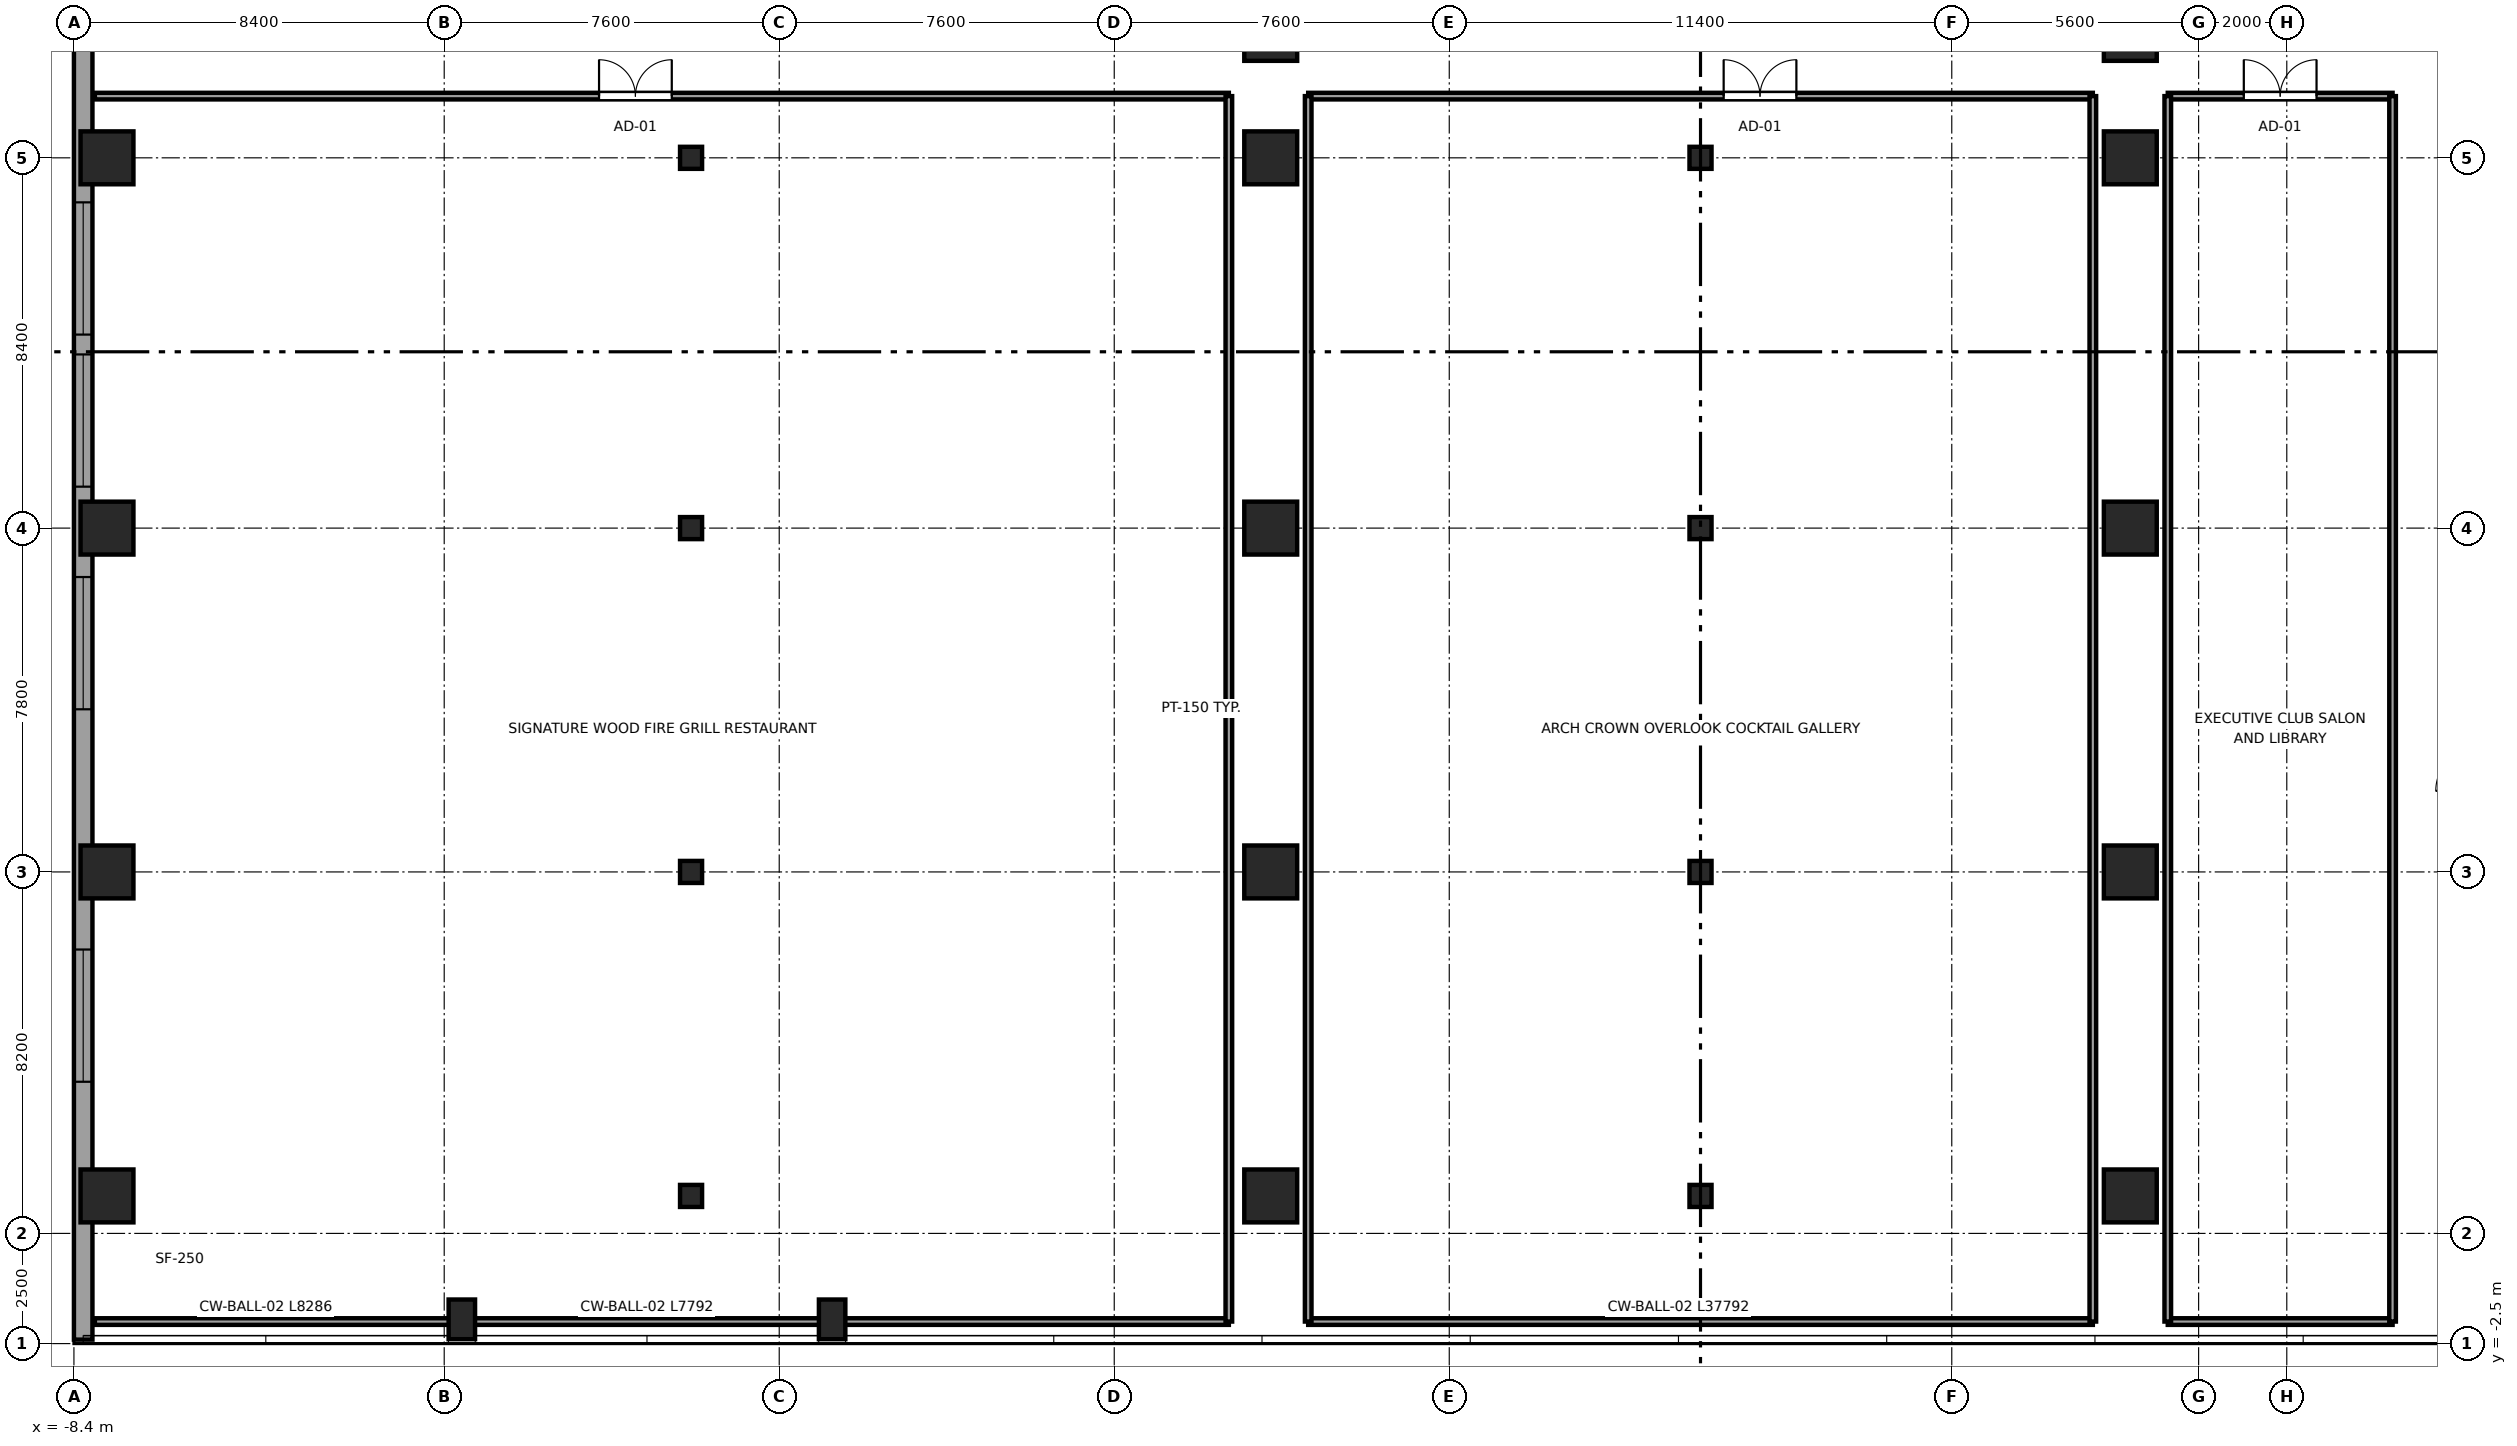
"""IFC4 building model, lengths in metres.
Left out: names, types, materials, properties, quantities, classifications, styles, units other than length and angle.
Written with IfcOpenShell. Run it as: python <this file> out.ifc"""

import sys

from ifc_helpers import new_model, si_unit, direction, frame, frame_2d, origin, origin_2d, place, context, subcontext, project, spatial, rectangle, i_section, extrude, source, transform, mapped, element, fill, save


model = new_model("IFC4")
c1 = context("Model", 3, precision=1e-05, world=origin(), true_north=direction((0.0, 1.0)))
c2 = subcontext(c1, "Body", "Model", "MODEL_VIEW")
j1 = project(units=[si_unit("LENGTHUNIT", "METRE"), si_unit("PLANEANGLEUNIT", "RADIAN")], contexts=[c1])
p1 = place(None, origin())
s1 = spatial("IfcSite", under=j1, at=p1, CompositionType="ELEMENT")
p2 = place(p1, origin())
s2 = spatial("IfcBuilding", under=s1, at=p2, CompositionType="ELEMENT")
p3 = place(p2, frame((0.0, 0.0, 22.4)))
s3 = spatial("IfcBuildingStorey", under=s2, at=p3, CompositionType="ELEMENT", Elevation=22.4)
m1 = source(origin(), c2, "Body", "SweptSolid", [
    extrude(rectangle(XDim=1.2, YDim=1.2, at=origin_2d()), origin(), (0.0, 0.0, 1.0), 4.4),
])
for number, where, z_axis, x_axis in (
    (1, (-7.65, 0.85, 0.0), (0.0, 0.0, 1.0), (1.0, 0.0, 0.0)),
    (2, (-7.65, 8.2, 0.0), (0.0, 0.0, 1.0), (1.0, 0.0, 0.0)),
    (3, (-7.65, 16.0, 0.0), (0.0, 0.0, 1.0), (1.0, 0.0, 0.0)),
    (4, (-7.65, 24.4, 0.0), (0.0, 0.0, 1.0), (1.0, 0.0, 0.0)),
    (5, (18.75, 0.85, 0.0), (0.0, 0.0, 1.0), (1.0, 0.0, 0.0)),
    (6, (38.25, 0.85, 0.0), (0.0, 0.0, 1.0), (1.0, 0.0, 0.0)),
    (7, (18.75, 8.2, 0.0), (0.0, 0.0, 1.0), (1.0, 0.0, 0.0)),
    (8, (38.25, 8.2, 0.0), (0.0, 0.0, 1.0), (1.0, 0.0, 0.0)),
    (9, (18.75, 16.0, 0.0), (0.0, 0.0, 1.0), (1.0, 0.0, 0.0)),
    (10, (38.25, 16.0, 0.0), (0.0, 0.0, 1.0), (1.0, 0.0, 0.0)),
    (11, (18.75, 24.4, 0.0), (0.0, 0.0, 1.0), (1.0, 0.0, 0.0)),
    (12, (38.25, 24.4, 0.0), (0.0, 0.0, 1.0), (1.0, 0.0, 0.0)),
    (13, (18.75, 27.2, 0.0), (0.0, 0.0, 1.0), (1.0, 0.0, 0.0)),
    (14, (38.25, 27.2, 0.0), (0.0, 0.0, 1.0), (1.0, 0.0, 0.0)),
):
    element("IfcColumn", number, at=place(p3, frame(where, z_axis=z_axis, x_axis=x_axis)), inside=s3, PredefinedType="COLUMN", context=c2, shape_type="MappedRepresentation", body=[
        mapped(m1, transform((0.0, 0.0, 0.0), x_axis=(1.0, 0.0, 0.0), y_axis=(0.0, 1.0, 0.0), z_axis=(0.0, 0.0, 1.0), scale=1.0)),
    ])
m2 = source(origin(), c2, "Body", "SweptSolid", [
    extrude(i_section(OverallWidth=0.5, OverallDepth=0.5, WebThickness=0.028, FlangeThickness=0.045, at=origin_2d()), origin(), (0.0, 0.0, 1.0), 4.4),
])
for number, where, z_axis, x_axis in (
    (15, (5.6, 0.85, 0.0), (0.0, 0.0, 1.0), (1.0, 0.0, 0.0)),
    (16, (5.6, 8.2, 0.0), (0.0, 0.0, 1.0), (1.0, 0.0, 0.0)),
    (17, (5.6, 16.0, 0.0), (0.0, 0.0, 1.0), (1.0, 0.0, 0.0)),
    (18, (5.6, 24.4, 0.0), (0.0, 0.0, 1.0), (1.0, 0.0, 0.0)),
    (19, (28.5, 0.85, 0.0), (0.0, 0.0, 1.0), (1.0, 0.0, 0.0)),
    (20, (28.5, 8.2, 0.0), (0.0, 0.0, 1.0), (1.0, 0.0, 0.0)),
    (21, (28.5, 16.0, 0.0), (0.0, 0.0, 1.0), (1.0, 0.0, 0.0)),
    (22, (28.5, 24.4, 0.0), (0.0, 0.0, 1.0), (1.0, 0.0, 0.0)),
):
    element("IfcColumn", number, at=place(p3, frame(where, z_axis=z_axis, x_axis=x_axis)), inside=s3, PredefinedType="COLUMN", context=c2, shape_type="MappedRepresentation", body=[
        mapped(m2, transform((0.0, 0.0, 0.0), x_axis=(1.0, 0.0, 0.0), y_axis=(0.0, 1.0, 0.0), z_axis=(0.0, 0.0, 1.0), scale=1.0)),
    ])
m3 = source(origin(), c2, "Body", "SweptSolid", [
    extrude(rectangle(XDim=0.6, YDim=0.9, at=origin_2d()), origin(), (0.0, 0.0, 1.0), 4.4),
])
for number, where, z_axis, x_axis in (
    (23, (0.4, -1.95, 0.0), (0.0, 0.0, 1.0), (1.0, 0.0, 0.0)),
    (24, (8.8, -1.95, 0.0), (0.0, 0.0, 1.0), (1.0, 0.0, 0.0)),
):
    element("IfcColumn", number, at=place(p3, frame(where, z_axis=z_axis, x_axis=x_axis)), inside=s3, PredefinedType="PILASTER", context=c2, shape_type="MappedRepresentation", body=[
        mapped(m3, transform((0.0, 0.0, 0.0), x_axis=(1.0, 0.0, 0.0), y_axis=(0.0, 1.0, 0.0), z_axis=(0.0, 0.0, 1.0), scale=1.0)),
    ])
p4 = place(p3, frame((-8.19, 48.29, 0.0), z_axis=(0.0, 0.0, 1.0), x_axis=(0.0, -1.0, 0.0)))
e25 = element("IfcWall", 25, at=p4, inside=s3, PredefinedType="SOLIDWALL", context=c2, shape_type="SweptSolid", body=[
    extrude(rectangle(XDim=50.7, YDim=0.42, at=frame_2d((25.35, 0.0))), origin(), (0.0, 0.0, 1.0), 4.14),
])
p5 = place(p4, frame((5.85, 0.0, 0.65)))
e26 = element("IfcOpeningElement", 26, at=p5, cuts=e25, PredefinedType="OPENING", context=c2, shape_type="SweptSolid", body=[
    extrude(rectangle(XDim=3.0, YDim=2.5, at=frame_2d((1.5, 1.25))), frame((0.0, 0.22, 0.0), z_axis=(0.0, -1.0, 0.0), x_axis=(1.0, 0.0, 0.0)), (0.0, 0.0, 1.0), 0.44),
])
p6 = place(p4, frame((10.35, 0.0, 0.65)))
e27 = element("IfcOpeningElement", 27, at=p6, cuts=e25, PredefinedType="OPENING", context=c2, shape_type="SweptSolid", body=[
    extrude(rectangle(XDim=3.0, YDim=2.5, at=frame_2d((1.5, 1.25))), frame((0.0, 0.22, 0.0), z_axis=(0.0, -1.0, 0.0), x_axis=(1.0, 0.0, 0.0)), (0.0, 0.0, 1.0), 0.44),
])
p7 = place(p4, frame((24.9, 0.0, 0.65)))
e28 = element("IfcOpeningElement", 28, at=p7, cuts=e25, PredefinedType="OPENING", context=c2, shape_type="SweptSolid", body=[
    extrude(rectangle(XDim=3.0, YDim=2.5, at=frame_2d((1.5, 1.25))), frame((0.0, 0.22, 0.0), z_axis=(0.0, -1.0, 0.0), x_axis=(1.0, 0.0, 0.0)), (0.0, 0.0, 1.0), 0.44),
])
p8 = place(p4, frame((28.35, 0.0, 0.65)))
e29 = element("IfcOpeningElement", 29, at=p8, cuts=e25, PredefinedType="OPENING", context=c2, shape_type="SweptSolid", body=[
    extrude(rectangle(XDim=3.0, YDim=2.5, at=frame_2d((1.5, 1.25))), frame((0.0, 0.22, 0.0), z_axis=(0.0, -1.0, 0.0), x_axis=(1.0, 0.0, 0.0)), (0.0, 0.0, 1.0), 0.44),
])
p9 = place(p4, frame((33.4, 0.0, 0.65)))
e30 = element("IfcOpeningElement", 30, at=p9, cuts=e25, PredefinedType="OPENING", context=c2, shape_type="SweptSolid", body=[
    extrude(rectangle(XDim=3.0, YDim=2.5, at=frame_2d((1.5, 1.25))), frame((0.0, 0.22, 0.0), z_axis=(0.0, -1.0, 0.0), x_axis=(1.0, 0.0, 0.0)), (0.0, 0.0, 1.0), 0.44),
])
p10 = place(p4, frame((41.85, 0.0, 0.65)))
e31 = element("IfcOpeningElement", 31, at=p10, cuts=e25, PredefinedType="OPENING", context=c2, shape_type="SweptSolid", body=[
    extrude(rectangle(XDim=3.0, YDim=2.5, at=frame_2d((1.5, 1.25))), frame((0.0, 0.22, 0.0), z_axis=(0.0, -1.0, 0.0), x_axis=(1.0, 0.0, 0.0)), (0.0, 0.0, 1.0), 0.44),
])
p11 = place(p3, frame((-7.925, -2.0, 0.0), z_axis=(0.0, 0.0, 1.0), x_axis=(1.0, 0.0, 0.0)))
e32 = element("IfcWall", 32, at=p11, inside=s3, PredefinedType="PARTITIONING", context=c2, shape_type="SweptSolid", body=[
    extrude(rectangle(XDim=25.725, YDim=0.15, at=frame_2d((12.863, 0.0))), origin(), (0.0, 0.0, 1.0), 3.43),
])
p12 = place(p3, frame((-7.925, 25.8, 0.0), z_axis=(0.0, 0.0, 1.0), x_axis=(1.0, 0.0, 0.0)))
e33 = element("IfcWall", 33, at=p12, inside=s3, PredefinedType="PARTITIONING", context=c2, shape_type="SweptSolid", body=[
    extrude(rectangle(XDim=25.725, YDim=0.15, at=frame_2d((12.863, 0.0))), origin(), (0.0, 0.0, 1.0), 4.14),
])
p13 = place(p12, frame((11.438, 0.0, 0.0)))
e34 = element("IfcOpeningElement", 34, at=p13, cuts=e33, PredefinedType="OPENING", context=c2, shape_type="SweptSolid", body=[
    extrude(rectangle(XDim=1.65, YDim=2.15, at=frame_2d((0.825, 1.075))), frame((0.0, 0.085, 0.0), z_axis=(0.0, -1.0, 0.0), x_axis=(1.0, 0.0, 0.0)), (0.0, 0.0, 1.0), 0.17),
])
p14 = place(p3, frame((17.8, -2.0, 0.0), z_axis=(0.0, 0.0, 1.0), x_axis=(0.0, 1.0, 0.0)))
e35 = element("IfcWall", 35, at=p14, inside=s3, PredefinedType="PARTITIONING", context=c2, shape_type="SweptSolid", body=[
    extrude(rectangle(XDim=27.8, YDim=0.15, at=frame_2d((13.9, 0.0))), origin(), (0.0, 0.0, 1.0), 4.14),
])
p15 = place(p3, frame((19.6, -2.0, 0.0), z_axis=(0.0, 0.0, 1.0), x_axis=(1.0, 0.0, 0.0)))
e36 = element("IfcWall", 36, at=p15, inside=s3, PredefinedType="PARTITIONING", context=c2, shape_type="SweptSolid", body=[
    extrude(rectangle(XDim=17.8, YDim=0.15, at=frame_2d((8.9, 0.0))), origin(), (0.0, 0.0, 1.0), 4.14),
])
p16 = place(p3, frame((19.6, 25.8, 0.0), z_axis=(0.0, 0.0, 1.0), x_axis=(1.0, 0.0, 0.0)))
e37 = element("IfcWall", 37, at=p16, inside=s3, PredefinedType="PARTITIONING", context=c2, shape_type="SweptSolid", body=[
    extrude(rectangle(XDim=17.8, YDim=0.15, at=frame_2d((8.9, 0.0))), origin(), (0.0, 0.0, 1.0), 4.14),
])
p17 = place(p16, frame((9.425, 0.0, 0.0)))
e38 = element("IfcOpeningElement", 38, at=p17, cuts=e37, PredefinedType="OPENING", context=c2, shape_type="SweptSolid", body=[
    extrude(rectangle(XDim=1.65, YDim=2.15, at=frame_2d((0.825, 1.075))), frame((0.0, 0.085, 0.0), z_axis=(0.0, -1.0, 0.0), x_axis=(1.0, 0.0, 0.0)), (0.0, 0.0, 1.0), 0.17),
])
for number, where, z_axis, x_axis in (
    (39, (19.6, -2.0, 0.0), (0.0, 0.0, 1.0), (0.0, 1.0, 0.0)),
    (40, (37.4, -2.0, 0.0), (0.0, 0.0, 1.0), (0.0, 1.0, 0.0)),
):
    element("IfcWall", number, at=place(p3, frame(where, z_axis=z_axis, x_axis=x_axis)), inside=s3, PredefinedType="PARTITIONING", context=c2, shape_type="SweptSolid", body=[
        extrude(rectangle(XDim=27.8, YDim=0.15, at=frame_2d((13.9, 0.0))), origin(), (0.0, 0.0, 1.0), 4.14),
    ])
p18 = place(p3, frame((39.1, -2.0, 0.0), z_axis=(0.0, 0.0, 1.0), x_axis=(1.0, 0.0, 0.0)))
e41 = element("IfcWall", 41, at=p18, inside=s3, PredefinedType="PARTITIONING", context=c2, shape_type="SweptSolid", body=[
    extrude(rectangle(XDim=5.1, YDim=0.15, at=frame_2d((2.55, 0.0))), origin(), (0.0, 0.0, 1.0), 3.43),
])
p19 = place(p3, frame((39.1, 25.8, 0.0), z_axis=(0.0, 0.0, 1.0), x_axis=(1.0, 0.0, 0.0)))
e42 = element("IfcWall", 42, at=p19, inside=s3, PredefinedType="PARTITIONING", context=c2, shape_type="SweptSolid", body=[
    extrude(rectangle(XDim=5.1, YDim=0.15, at=frame_2d((2.55, 0.0))), origin(), (0.0, 0.0, 1.0), 4.14),
])
p20 = place(p19, frame((1.725, 0.0, 0.0)))
e43 = element("IfcOpeningElement", 43, at=p20, cuts=e42, PredefinedType="OPENING", context=c2, shape_type="SweptSolid", body=[
    extrude(rectangle(XDim=1.65, YDim=2.15, at=frame_2d((0.825, 1.075))), frame((0.0, 0.085, 0.0), z_axis=(0.0, -1.0, 0.0), x_axis=(1.0, 0.0, 0.0)), (0.0, 0.0, 1.0), 0.17),
])
p21 = place(p3, frame((39.1, -2.0, 0.0), z_axis=(0.0, 0.0, 1.0), x_axis=(0.0, 1.0, 0.0)))
e44 = element("IfcWall", 44, at=p21, inside=s3, PredefinedType="PARTITIONING", context=c2, shape_type="SweptSolid", body=[
    extrude(rectangle(XDim=27.8, YDim=0.15, at=frame_2d((13.9, 0.0))), origin(), (0.0, 0.0, 1.0), 4.14),
])
p22 = place(p3, frame((44.2, -2.0, 0.0), z_axis=(0.0, 0.0, 1.0), x_axis=(0.0, 1.0, 0.0)))
e45 = element("IfcWall", 45, at=p22, inside=s3, PredefinedType="PARTITIONING", context=c2, shape_type="SweptSolid", body=[
    extrude(rectangle(XDim=27.8, YDim=0.15, at=frame_2d((13.9, 0.0))), origin(), (0.0, 0.0, 1.0), 3.676),
])
m4 = source(origin(), c2, "Body", "SweptSolid", [
    extrude(rectangle(XDim=3.0, YDim=2.5, at=frame_2d((1.5, 1.25))), frame((0.0, 0.09, 0.0), z_axis=(0.0, -1.0, 0.0), x_axis=(1.0, 0.0, 0.0)), (0.0, 0.0, 1.0), 0.06),
])
p23 = place(p7, origin())
e46 = element("IfcWindow", 46, at=p23, inside=s3, PartitioningType="TRIPLE_PANEL_HORIZONTAL", PredefinedType="WINDOW", context=c2, shape_type="MappedRepresentation", body=[
    mapped(m4, transform((0.0, 0.0, 0.0), x_axis=(1.0, 0.0, 0.0), y_axis=(0.0, 1.0, 0.0), z_axis=(0.0, 0.0, 1.0), scale=1.0)),
])
fill(e28, e46)
p24 = place(p8, origin())
e47 = element("IfcWindow", 47, at=p24, inside=s3, PartitioningType="TRIPLE_PANEL_HORIZONTAL", PredefinedType="WINDOW", context=c2, shape_type="MappedRepresentation", body=[
    mapped(m4, transform((0.0, 0.0, 0.0), x_axis=(1.0, 0.0, 0.0), y_axis=(0.0, 1.0, 0.0), z_axis=(0.0, 0.0, 1.0), scale=1.0)),
])
fill(e29, e47)
p25 = place(p9, origin())
e48 = element("IfcWindow", 48, at=p25, inside=s3, PartitioningType="TRIPLE_PANEL_HORIZONTAL", PredefinedType="WINDOW", context=c2, shape_type="MappedRepresentation", body=[
    mapped(m4, transform((0.0, 0.0, 0.0), x_axis=(1.0, 0.0, 0.0), y_axis=(0.0, 1.0, 0.0), z_axis=(0.0, 0.0, 1.0), scale=1.0)),
])
fill(e30, e48)
p26 = place(p10, origin())
e49 = element("IfcWindow", 49, at=p26, inside=s3, PartitioningType="TRIPLE_PANEL_HORIZONTAL", PredefinedType="WINDOW", context=c2, shape_type="MappedRepresentation", body=[
    mapped(m4, transform((0.0, 0.0, 0.0), x_axis=(1.0, 0.0, 0.0), y_axis=(0.0, 1.0, 0.0), z_axis=(0.0, 0.0, 1.0), scale=1.0)),
])
fill(e31, e49)
m5 = source(origin(), c2, "Body", "SweptSolid", [
    extrude(rectangle(XDim=1.65, YDim=2.15, at=frame_2d((0.825, 1.075))), frame((0.0, 0.025, 0.0), z_axis=(0.0, -1.0, 0.0), x_axis=(1.0, 0.0, 0.0)), (0.0, 0.0, 1.0), 0.05),
])
p27 = place(p13, origin())
e50 = element("IfcDoor", 50, at=p27, inside=s3, OperationType="DOUBLE_DOOR_SINGLE_SWING", PredefinedType="DOOR", context=c2, shape_type="MappedRepresentation", body=[
    mapped(m5, transform((0.0, 0.0, 0.0), x_axis=(1.0, 0.0, 0.0), y_axis=(0.0, 1.0, 0.0), z_axis=(0.0, 0.0, 1.0), scale=1.0)),
])
fill(e34, e50)
p28 = place(p17, origin())
e51 = element("IfcDoor", 51, at=p28, inside=s3, OperationType="DOUBLE_DOOR_SINGLE_SWING", PredefinedType="DOOR", context=c2, shape_type="MappedRepresentation", body=[
    mapped(m5, transform((0.0, 0.0, 0.0), x_axis=(1.0, 0.0, 0.0), y_axis=(0.0, 1.0, 0.0), z_axis=(0.0, 0.0, 1.0), scale=1.0)),
])
fill(e38, e51)
p29 = place(p20, origin())
e52 = element("IfcDoor", 52, at=p29, inside=s3, OperationType="DOUBLE_DOOR_SINGLE_SWING", PredefinedType="DOOR", context=c2, shape_type="MappedRepresentation", body=[
    mapped(m5, transform((0.0, 0.0, 0.0), x_axis=(1.0, 0.0, 0.0), y_axis=(0.0, 1.0, 0.0), z_axis=(0.0, 0.0, 1.0), scale=1.0)),
])
fill(e43, e52)
save(model, sys.argv[1])
